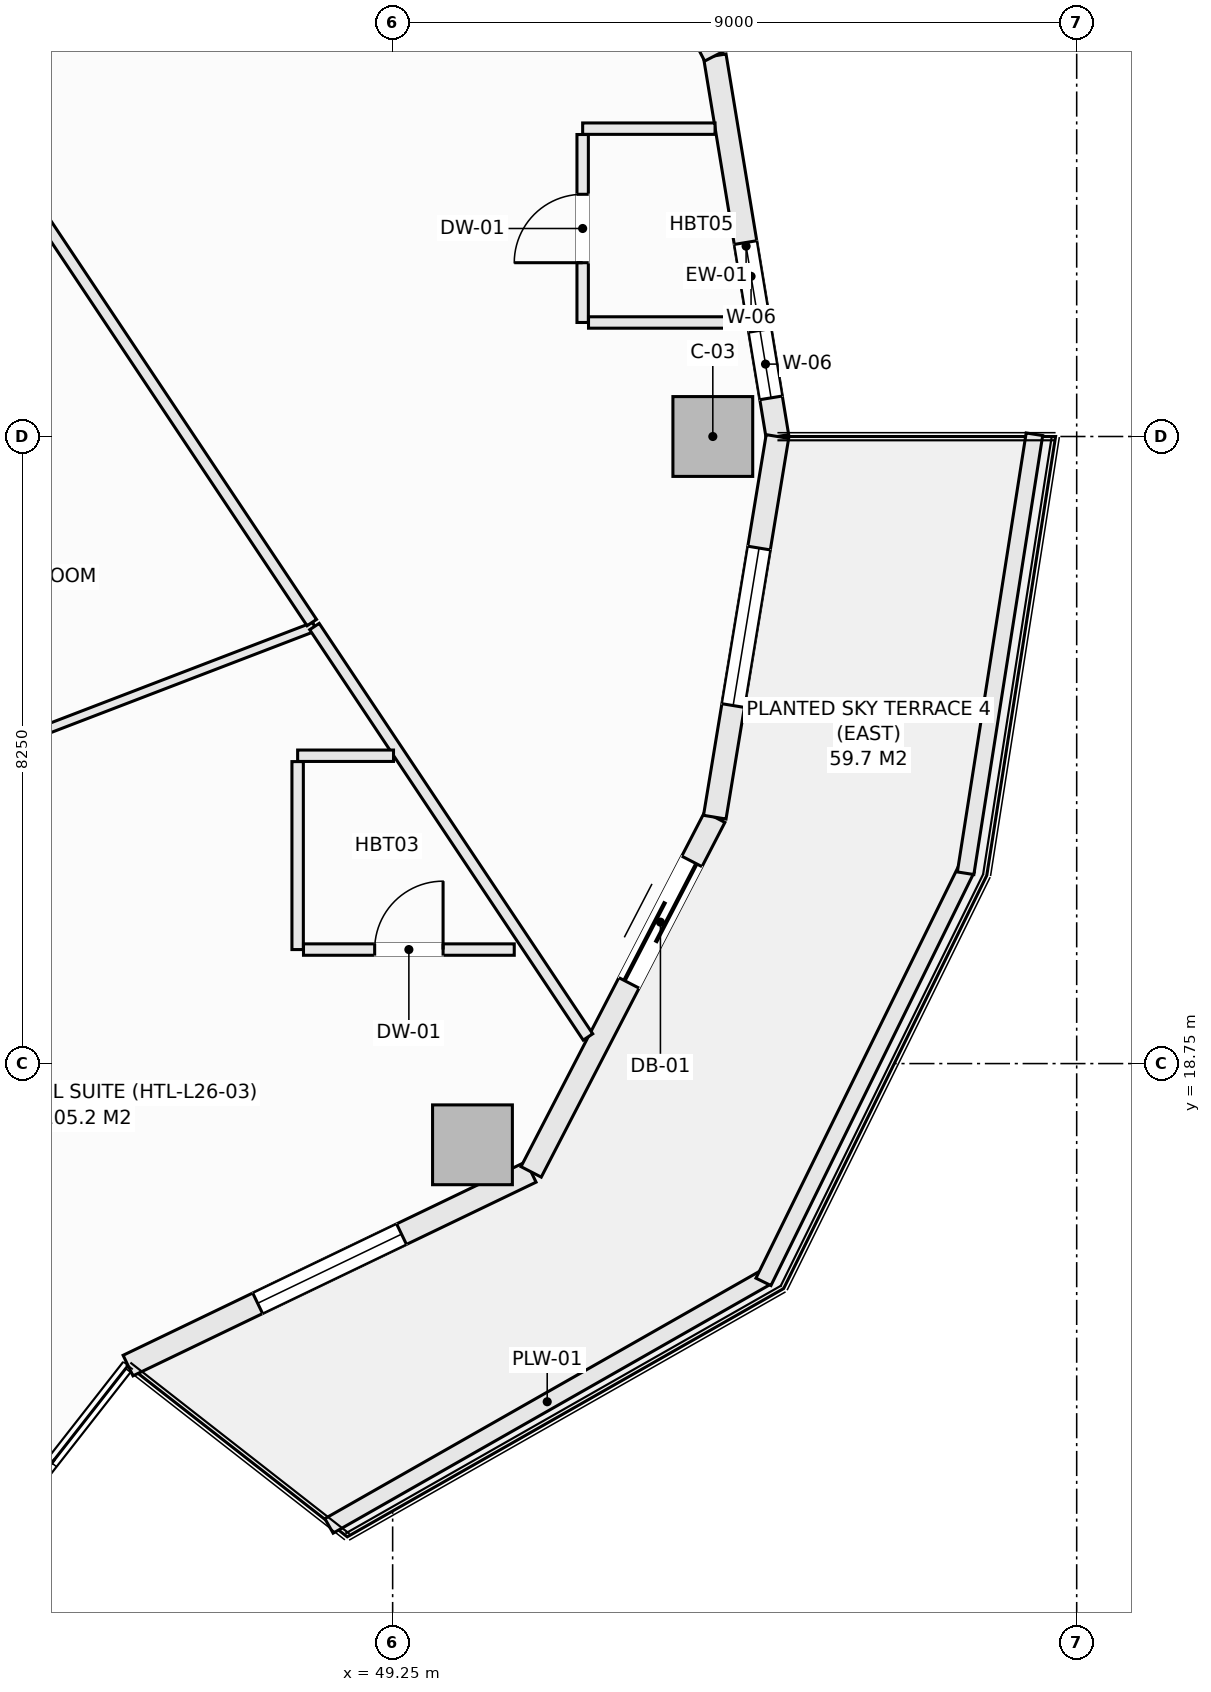
"""IFC4 building model, lengths in metres.
Left out: names, types, materials, properties, quantities, classifications, styles, units other than length and angle.
Written with IfcOpenShell. Run it as: python <this file> out.ifc"""

import sys

from ifc_helpers import new_model, si_unit, direction, frame, frame_2d, origin, origin_2d, place, context, subcontext, project, spatial, rectangle, extrude, element, fill, save


model = new_model("IFC4")
c1 = context("Model", 3, precision=1e-05, world=origin(), true_north=direction((0.0, 1.0)))
c2 = subcontext(c1, "Body", "Model", "MODEL_VIEW")
j1 = project(units=[si_unit("LENGTHUNIT", "METRE"), si_unit("PLANEANGLEUNIT", "RADIAN")], contexts=[c1])
p1 = place(None, origin())
s1 = spatial("IfcSite", under=j1, at=p1, CompositionType="ELEMENT")
p2 = place(p1, origin())
s2 = spatial("IfcBuilding", under=s1, at=p2, CompositionType="ELEMENT")
p3 = place(p2, frame((0.0, 0.0, 108.7)))
s3 = spatial("IfcBuildingStorey", under=s2, at=p3, CompositionType="ELEMENT", Elevation=108.7)
for number, where, z_axis, x_axis in (
    (1, (53.462, 27.0, -0.27), (0.0, 0.0, 1.0), (1.0, 0.0, 0.0)),
    (2, (50.3, 17.681, -0.27), (0.0, 0.0, 1.0), (1.0, 0.0, 0.0)),
):
    element("IfcColumn", number, at=place(p3, frame(where, z_axis=z_axis, x_axis=x_axis)), inside=s3, PredefinedType="COLUMN", context=c2, shape_type="SweptSolid", body=[
        extrude(rectangle(XDim=1.05, YDim=1.05, at=origin_2d()), origin(), (0.0, 0.0, 1.0), 3.4),
    ])
p4 = place(p3, frame((53.488, 32.008, 0.0), z_axis=(0.0, 0.0, 1.0), x_axis=(0.162393944769, -0.986726003864, 0.0)))
e3 = element("IfcWall", 3, at=p4, inside=s3, PredefinedType="SOLIDWALL", context=c2, shape_type="SweptSolid", body=[
    extrude(rectangle(XDim=5.075, YDim=0.3, at=frame_2d((2.538, 0.0))), origin(), (0.0, 0.0, 1.0), 2.653),
])
p5 = place(p4, frame((2.49, 0.0, 0.72)))
e4 = element("IfcOpeningElement", 4, at=p5, cuts=e3, PredefinedType="OPENING", context=c2, shape_type="SweptSolid", body=[
    extrude(rectangle(XDim=0.9, YDim=1.65, at=frame_2d((0.45, 0.825))), frame((0.0, 0.16, 0.0), z_axis=(0.0, -1.0, 0.0), x_axis=(1.0, 0.0, 0.0)), (0.0, 0.0, 1.0), 0.32),
])
p6 = place(p4, frame((3.66, 0.0, 0.72)))
e5 = element("IfcOpeningElement", 5, at=p6, cuts=e3, PredefinedType="OPENING", context=c2, shape_type="SweptSolid", body=[
    extrude(rectangle(XDim=0.9, YDim=1.65, at=frame_2d((0.45, 0.825))), frame((0.0, 0.16, 0.0), z_axis=(0.0, -1.0, 0.0), x_axis=(1.0, 0.0, 0.0)), (0.0, 0.0, 1.0), 0.32),
])
p7 = place(p3, frame((51.072, 36.675, 0.0), z_axis=(0.0, 0.0, 1.0), x_axis=(0.459767899643, -0.888039119892, 0.0)))
e6 = element("IfcWall", 6, at=p7, inside=s3, PredefinedType="SOLIDWALL", context=c2, shape_type="SweptSolid", body=[
    extrude(rectangle(XDim=5.255, YDim=0.3, at=frame_2d((2.628, 0.0))), origin(), (0.0, 0.0, 1.0), 2.653),
])
p8 = place(p7, frame((1.578, 0.0, 0.74)))
e7 = element("IfcOpeningElement", 7, at=p8, cuts=e6, PredefinedType="OPENING", context=c2, shape_type="SweptSolid", body=[
    extrude(rectangle(XDim=2.1, YDim=1.7, at=frame_2d((1.05, 0.85))), frame((0.0, 0.16, 0.0), z_axis=(0.0, -1.0, 0.0), x_axis=(1.0, 0.0, 0.0)), (0.0, 0.0, 1.0), 0.32),
])
p9 = place(p3, frame((45.769, 14.777, 0.0), z_axis=(0.0, 0.0, 1.0), x_axis=(0.901370184739, 0.433049408339, 0.0)))
e8 = element("IfcWall", 8, at=p9, inside=s3, PredefinedType="SOLIDWALL", context=c2, shape_type="SweptSolid", body=[
    extrude(rectangle(XDim=5.884, YDim=0.3, at=frame_2d((2.942, 0.0))), origin(), (0.0, 0.0, 1.0), 2.653),
])
p10 = place(p9, frame((1.892, 0.0, 0.74)))
e9 = element("IfcOpeningElement", 9, at=p10, cuts=e8, PredefinedType="OPENING", context=c2, shape_type="SweptSolid", body=[
    extrude(rectangle(XDim=2.1, YDim=1.7, at=frame_2d((1.05, 0.85))), frame((0.0, 0.16, 0.0), z_axis=(0.0, -1.0, 0.0), x_axis=(1.0, 0.0, 0.0)), (0.0, 0.0, 1.0), 0.32),
])
p11 = place(p3, frame((51.072, 17.325, 0.0), z_axis=(0.0, 0.0, 1.0), x_axis=(0.459767899643, 0.888039119892, 0.0)))
e10 = element("IfcWall", 10, at=p11, inside=s3, PredefinedType="SOLIDWALL", context=c2, shape_type="SweptSolid", body=[
    extrude(rectangle(XDim=5.255, YDim=0.3, at=frame_2d((2.628, 0.0))), origin(), (0.0, 0.0, 1.0), 2.653),
])
p12 = place(p11, frame((2.8, 0.0, 0.0)))
e11 = element("IfcOpeningElement", 11, at=p12, cuts=e10, PredefinedType="OPENING", context=c2, shape_type="SweptSolid", body=[
    extrude(rectangle(XDim=1.8, YDim=2.25, at=frame_2d((0.9, 1.125))), frame((0.0, 0.16, 0.0), z_axis=(0.0, -1.0, 0.0), x_axis=(1.0, 0.0, 0.0)), (0.0, 0.0, 1.0), 0.32),
])
p13 = place(p3, frame((53.488, 21.992, 0.0), z_axis=(0.0, 0.0, 1.0), x_axis=(0.162393944769, 0.986726003864, 0.0)))
e12 = element("IfcWall", 12, at=p13, inside=s3, PredefinedType="SOLIDWALL", context=c2, shape_type="SweptSolid", body=[
    extrude(rectangle(XDim=5.075, YDim=0.3, at=frame_2d((2.538, 0.0))), origin(), (0.0, 0.0, 1.0), 2.653),
])
p14 = place(p13, frame((1.488, 0.0, 0.74)))
e13 = element("IfcOpeningElement", 13, at=p14, cuts=e12, PredefinedType="OPENING", context=c2, shape_type="SweptSolid", body=[
    extrude(rectangle(XDim=2.1, YDim=1.7, at=frame_2d((1.05, 0.85))), frame((0.0, 0.16, 0.0), z_axis=(0.0, -1.0, 0.0), x_axis=(1.0, 0.0, 0.0)), (0.0, 0.0, 1.0), 0.32),
])
p15 = place(p3, frame((48.413, 12.668, 0.0), z_axis=(0.0, 0.0, 1.0), x_axis=(0.869187658335, 0.494482370361, 0.0)))
e14 = element("IfcWall", 14, at=p15, inside=s3, PredefinedType="PARAPET", context=c2, shape_type="SweptSolid", body=[
    extrude(rectangle(XDim=6.606, YDim=0.22, at=frame_2d((3.303, 0.0))), origin(), (0.0, 0.0, 1.0), 0.52),
])
p16 = place(p3, frame((54.129, 15.878, 0.0), z_axis=(0.0, 0.0, 1.0), x_axis=(0.441269631716, 0.897374566235, 0.0)))
e15 = element("IfcWall", 15, at=p16, inside=s3, PredefinedType="PARAPET", context=c2, shape_type="SweptSolid", body=[
    extrude(rectangle(XDim=6.056, YDim=0.22, at=frame_2d((3.028, 0.0))), origin(), (0.0, 0.0, 1.0), 0.52),
])
p17 = place(p3, frame((56.789, 21.254, 0.0), z_axis=(0.0, 0.0, 1.0), x_axis=(0.154903030247, 0.987929679289, 0.0)))
e16 = element("IfcWall", 16, at=p17, inside=s3, PredefinedType="PARAPET", context=c2, shape_type="SweptSolid", body=[
    extrude(rectangle(XDim=5.846, YDim=0.22, at=frame_2d((2.923, 0.0))), origin(), (0.0, 0.0, 1.0), 0.52),
])
p18 = place(p3, frame((39.02, 20.97, 0.0), z_axis=(0.0, 0.0, 1.0), x_axis=(0.933683590648, 0.358099082035, 0.0)))
e17 = element("IfcWall", 17, at=p18, inside=s3, PredefinedType="PARTITIONING", context=c2, shape_type="SweptSolid", body=[
    extrude(rectangle(XDim=9.855, YDim=0.12, at=frame_2d((4.927, 0.0))), origin(), (0.0, 0.0, 1.0), 2.812),
])
p19 = place(p3, frame((37.565, 40.488, 0.0), z_axis=(0.0, 0.0, 1.0), x_axis=(0.554585457046, -0.832126775698, 0.0)))
e18 = element("IfcWall", 18, at=p19, inside=s3, PredefinedType="PARTITIONING", context=c2, shape_type="SweptSolid", body=[
    extrude(rectangle(XDim=19.151, YDim=0.15, at=frame_2d((9.575, 0.0))), origin(), (0.0, 0.0, 1.0), 3.13),
])
p20 = place(p3, frame((48.221, 24.5, 0.0), z_axis=(0.0, 0.0, 1.0), x_axis=(0.554587324832, -0.832125530876, 0.0)))
e19 = element("IfcWall", 19, at=p20, inside=s3, PredefinedType="PARTITIONING", context=c2, shape_type="SweptSolid", body=[
    extrude(rectangle(XDim=6.489, YDim=0.15, at=frame_2d((3.245, 0.0))), origin(), (0.0, 0.0, 1.0), 3.13),
])
p21 = place(p3, frame((48.0, 22.8, 0.0), z_axis=(0.0, 0.0, 1.0), x_axis=(1.0, 0.0, 0.0)))
e20 = element("IfcWall", 20, at=p21, inside=s3, PredefinedType="PARTITIONING", context=c2, shape_type="SweptSolid", body=[
    extrude(rectangle(XDim=1.261, YDim=0.15, at=frame_2d((0.631, 0.0))), origin(), (0.0, 0.0, 1.0), 2.812),
])
p22 = place(p3, frame((48.0, 20.25, 0.0), z_axis=(0.0, 0.0, 1.0), x_axis=(0.0, 1.0, 0.0)))
e21 = element("IfcWall", 21, at=p22, inside=s3, PredefinedType="PARTITIONING", context=c2, shape_type="SweptSolid", body=[
    extrude(rectangle(XDim=2.473, YDim=0.15, at=frame_2d((1.236, 0.0))), origin(), (0.0, 0.0, 1.0), 3.13),
])
p23 = place(p3, frame((48.077, 20.25, 0.0), z_axis=(0.0, 0.0, 1.0), x_axis=(1.0, 0.0, 0.0)))
e22 = element("IfcWall", 22, at=p23, inside=s3, PredefinedType="PARTITIONING", context=c2, shape_type="SweptSolid", body=[
    extrude(rectangle(XDim=2.773, YDim=0.15, at=frame_2d((1.387, 0.0))), origin(), (0.0, 0.0, 1.0), 3.13),
])
p24 = place(p23, frame((0.937, 0.0, 0.0)))
e23 = element("IfcOpeningElement", 23, at=p24, cuts=e22, PredefinedType="OPENING", context=c2, shape_type="SweptSolid", body=[
    extrude(rectangle(XDim=0.9, YDim=2.1, at=frame_2d((0.45, 1.05))), frame((0.0, 0.085, 0.0), z_axis=(0.0, -1.0, 0.0), x_axis=(1.0, 0.0, 0.0)), (0.0, 0.0, 1.0), 0.17),
])
p25 = place(p3, frame((51.75, 31.05, 0.0), z_axis=(0.0, 0.0, 1.0), x_axis=(1.0, 0.0, 0.0)))
e24 = element("IfcWall", 24, at=p25, inside=s3, PredefinedType="PARTITIONING", context=c2, shape_type="SweptSolid", body=[
    extrude(rectangle(XDim=1.742, YDim=0.15, at=frame_2d((0.871, 0.0))), origin(), (0.0, 0.0, 1.0), 3.13),
])
p26 = place(p3, frame((51.75, 28.5, 0.0), z_axis=(0.0, 0.0, 1.0), x_axis=(0.0, 1.0, 0.0)))
e25 = element("IfcWall", 25, at=p26, inside=s3, PredefinedType="PARTITIONING", context=c2, shape_type="SweptSolid", body=[
    extrude(rectangle(XDim=2.473, YDim=0.15, at=frame_2d((1.236, 0.0))), origin(), (0.0, 0.0, 1.0), 3.13),
])
p27 = place(p26, frame((0.787, 0.0, 0.0)))
e26 = element("IfcOpeningElement", 26, at=p27, cuts=e25, PredefinedType="OPENING", context=c2, shape_type="SweptSolid", body=[
    extrude(rectangle(XDim=0.9, YDim=2.1, at=frame_2d((0.45, 1.05))), frame((0.0, 0.085, 0.0), z_axis=(0.0, -1.0, 0.0), x_axis=(1.0, 0.0, 0.0)), (0.0, 0.0, 1.0), 0.17),
])
p28 = place(p3, frame((51.827, 28.5, 0.0), z_axis=(0.0, 0.0, 1.0), x_axis=(1.0, 0.0, 0.0)))
e27 = element("IfcWall", 27, at=p28, inside=s3, PredefinedType="PARTITIONING", context=c2, shape_type="SweptSolid", body=[
    extrude(rectangle(XDim=2.085, YDim=0.15, at=frame_2d((1.042, 0.0))), origin(), (0.0, 0.0, 1.0), 3.13),
])
p29 = place(p5, origin())
e28 = element("IfcWindow", 28, at=p29, inside=s3, PartitioningType="SINGLE_PANEL", PredefinedType="WINDOW", context=c2, shape_type="SweptSolid", body=[
    extrude(rectangle(XDim=0.9, YDim=1.65, at=frame_2d((0.45, 0.825))), frame((0.0, 0.03, 0.0), z_axis=(0.0, -1.0, 0.0), x_axis=(1.0, 0.0, 0.0)), (0.0, 0.0, 1.0), 0.06),
])
fill(e4, e28)
p30 = place(p10, origin())
e29 = element("IfcWindow", 29, at=p30, inside=s3, PartitioningType="SINGLE_PANEL", PredefinedType="WINDOW", context=c2, shape_type="SweptSolid", body=[
    extrude(rectangle(XDim=2.1, YDim=1.7, at=frame_2d((1.05, 0.85))), frame((0.0, 0.03, 0.0), z_axis=(0.0, -1.0, 0.0), x_axis=(1.0, 0.0, 0.0)), (0.0, 0.0, 1.0), 0.06),
])
fill(e9, e29)
p31 = place(p12, frame((1.8, 0.0, 0.0), z_axis=(0.0, 0.0, 1.0), x_axis=(-1.0, 0.0, 0.0)))
e30 = element("IfcDoor", 30, at=p31, inside=s3, OperationType="SLIDING_TO_LEFT", PredefinedType="DOOR", context=c2, shape_type="SweptSolid", body=[
    extrude(rectangle(XDim=1.8, YDim=2.25, at=frame_2d((0.9, 1.125))), frame((0.0, 0.025, 0.0), z_axis=(0.0, -1.0, 0.0), x_axis=(1.0, 0.0, 0.0)), (0.0, 0.0, 1.0), 0.05),
])
fill(e11, e30)
p32 = place(p14, origin())
e31 = element("IfcWindow", 31, at=p32, inside=s3, PartitioningType="SINGLE_PANEL", PredefinedType="WINDOW", context=c2, shape_type="SweptSolid", body=[
    extrude(rectangle(XDim=2.1, YDim=1.7, at=frame_2d((1.05, 0.85))), frame((0.0, 0.03, 0.0), z_axis=(0.0, -1.0, 0.0), x_axis=(1.0, 0.0, 0.0)), (0.0, 0.0, 1.0), 0.06),
])
fill(e13, e31)
p33 = place(p24, origin())
e32 = element("IfcDoor", 32, at=p33, inside=s3, OperationType="SINGLE_SWING_RIGHT", PredefinedType="DOOR", context=c2, shape_type="SweptSolid", body=[
    extrude(rectangle(XDim=0.9, YDim=2.1, at=frame_2d((0.45, 1.05))), frame((0.0, 0.025, 0.0), z_axis=(0.0, -1.0, 0.0), x_axis=(1.0, 0.0, 0.0)), (0.0, 0.0, 1.0), 0.05),
])
fill(e23, e32)
p34 = place(p27, origin())
e33 = element("IfcDoor", 33, at=p34, inside=s3, OperationType="SINGLE_SWING_LEFT", PredefinedType="DOOR", context=c2, shape_type="SweptSolid", body=[
    extrude(rectangle(XDim=0.9, YDim=2.1, at=frame_2d((0.45, 1.05))), frame((0.0, 0.025, 0.0), z_axis=(0.0, -1.0, 0.0), x_axis=(1.0, 0.0, 0.0)), (0.0, 0.0, 1.0), 0.05),
])
fill(e26, e33)
p35 = place(p6, origin())
e34 = element("IfcWindow", 34, at=p35, inside=s3, PartitioningType="SINGLE_PANEL", PredefinedType="WINDOW", context=c2, shape_type="SweptSolid", body=[
    extrude(rectangle(XDim=0.9, YDim=1.65, at=frame_2d((0.45, 0.825))), frame((0.0, 0.03, 0.0), z_axis=(0.0, -1.0, 0.0), x_axis=(1.0, 0.0, 0.0)), (0.0, 0.0, 1.0), 0.06),
])
fill(e5, e34)
save(model, sys.argv[1])
